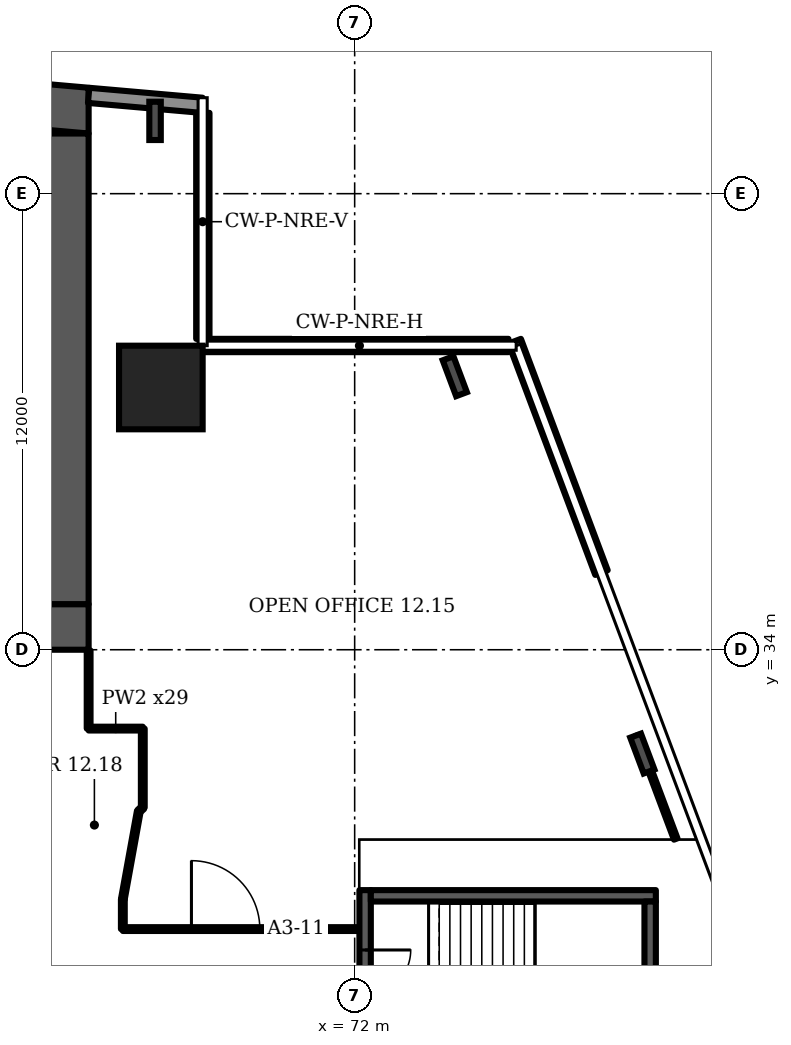
"""IFC4 building model, lengths in metres.
Left out: names, types, materials, properties, quantities, classifications, styles, units other than length and angle.
Written with IfcOpenShell. Run it as: python <this file> out.ifc"""

import sys

from ifc_helpers import new_model, si_unit, direction, frame, frame_2d, origin, origin_2d, place, context, subcontext, project, spatial, polyline, rectangle, i_section, outline, extrude, element, fill, save


model = new_model("IFC4")
c1 = context("Model", 3, precision=1e-05, world=origin(), true_north=direction((0.0, 1.0)))
c2 = subcontext(c1, "Body", "Model", "MODEL_VIEW")
j1 = project(units=[si_unit("LENGTHUNIT", "METRE"), si_unit("PLANEANGLEUNIT", "RADIAN")], contexts=[c1])
p1 = place(None, origin())
s1 = spatial("IfcSite", under=j1, at=p1, CompositionType="ELEMENT")
p2 = place(p1, origin())
s2 = spatial("IfcBuilding", under=s1, at=p2, CompositionType="ELEMENT")
p3 = place(p2, frame((0.0, 0.0, 63.1)))
s3 = spatial("IfcBuildingStorey", under=s2, at=p3, CompositionType="ELEMENT", Elevation=63.1)
p4 = place(p3, frame((0.0, 0.0, -0.0)))
e1 = element("IfcWall", 1, at=p4, inside=s3, PredefinedType="SHEAR", context=c2, shape_type="SweptSolid", body=[
    extrude(outline(polyline([(9.0, 47.583), (37.0, 50.032), (65.0, 47.583), (65.0, 48.787), (37.0, 51.237), (9.0, 48.787), (9.0, 47.583)])), origin(), (0.0, 0.0, 1.0), 3.6),
])
p5 = place(p3, frame((9.0, 34.6, 0.0), z_axis=(0.0, 0.0, 1.0), x_axis=(1.0, 0.0, 0.0)))
e2 = element("IfcWall", 2, at=p5, inside=s3, PredefinedType="SHEAR", context=c2, shape_type="SweptSolid", body=[
    extrude(rectangle(XDim=56.0, YDim=1.2, at=frame_2d((28.0, 0.0))), origin(), (0.0, 0.0, 1.0), 3.6),
])
p6 = place(p5, frame((3.3, 0.0, 0.0)))
e3 = element("IfcOpeningElement", 3, at=p6, cuts=e2, PredefinedType="OPENING", context=c2, shape_type="SweptSolid", body=[
    extrude(rectangle(XDim=1.0, YDim=2.1, at=frame_2d((0.5, 1.05))), frame((0.0, 0.61, 0.0), z_axis=(0.0, -1.0, 0.0), x_axis=(1.0, 0.0, 0.0)), (0.0, 0.0, 1.0), 1.22),
])
p7 = place(p5, frame((7.867, 0.0, 0.0)))
e4 = element("IfcOpeningElement", 4, at=p7, cuts=e2, PredefinedType="OPENING", context=c2, shape_type="SweptSolid", body=[
    extrude(rectangle(XDim=1.1, YDim=2.1, at=frame_2d((0.55, 1.05))), frame((0.0, 0.61, 0.0), z_axis=(0.0, -1.0, 0.0), x_axis=(1.0, 0.0, 0.0)), (0.0, 0.0, 1.0), 1.22),
])
p8 = place(p5, frame((12.033, 0.0, 0.0)))
e5 = element("IfcOpeningElement", 5, at=p8, cuts=e2, PredefinedType="OPENING", context=c2, shape_type="SweptSolid", body=[
    extrude(rectangle(XDim=1.1, YDim=2.1, at=frame_2d((0.55, 1.05))), frame((0.0, 0.61, 0.0), z_axis=(0.0, -1.0, 0.0), x_axis=(1.0, 0.0, 0.0)), (0.0, 0.0, 1.0), 1.22),
])
p9 = place(p5, frame((9.8, 0.0, 0.0)))
e6 = element("IfcOpeningElement", 6, at=p9, cuts=e2, PredefinedType="OPENING", context=c2, shape_type="SweptSolid", body=[
    extrude(rectangle(XDim=1.4, YDim=2.1, at=frame_2d((0.7, 1.05))), frame((0.0, 0.61, 0.0), z_axis=(0.0, -1.0, 0.0), x_axis=(1.0, 0.0, 0.0)), (0.0, 0.0, 1.0), 1.22),
])
p10 = place(p5, frame((14.65, 0.0, 0.0)))
e7 = element("IfcOpeningElement", 7, at=p10, cuts=e2, PredefinedType="OPENING", context=c2, shape_type="SweptSolid", body=[
    extrude(rectangle(XDim=1.2, YDim=2.1, at=frame_2d((0.6, 1.05))), frame((0.0, 0.61, 0.0), z_axis=(0.0, -1.0, 0.0), x_axis=(1.0, 0.0, 0.0)), (0.0, 0.0, 1.0), 1.22),
])
p11 = place(p5, frame((21.867, 0.0, 0.0)))
e8 = element("IfcOpeningElement", 8, at=p11, cuts=e2, PredefinedType="OPENING", context=c2, shape_type="SweptSolid", body=[
    extrude(rectangle(XDim=1.1, YDim=2.1, at=frame_2d((0.55, 1.05))), frame((0.0, 0.61, 0.0), z_axis=(0.0, -1.0, 0.0), x_axis=(1.0, 0.0, 0.0)), (0.0, 0.0, 1.0), 1.22),
])
p12 = place(p5, frame((26.033, 0.0, 0.0)))
e9 = element("IfcOpeningElement", 9, at=p12, cuts=e2, PredefinedType="OPENING", context=c2, shape_type="SweptSolid", body=[
    extrude(rectangle(XDim=1.1, YDim=2.1, at=frame_2d((0.55, 1.05))), frame((0.0, 0.61, 0.0), z_axis=(0.0, -1.0, 0.0), x_axis=(1.0, 0.0, 0.0)), (0.0, 0.0, 1.0), 1.22),
])
p13 = place(p5, frame((23.8, 0.0, 0.0)))
e10 = element("IfcOpeningElement", 10, at=p13, cuts=e2, PredefinedType="OPENING", context=c2, shape_type="SweptSolid", body=[
    extrude(rectangle(XDim=1.4, YDim=2.1, at=frame_2d((0.7, 1.05))), frame((0.0, 0.61, 0.0), z_axis=(0.0, -1.0, 0.0), x_axis=(1.0, 0.0, 0.0)), (0.0, 0.0, 1.0), 1.22),
])
p14 = place(p5, frame((28.867, 0.0, 0.0)))
e11 = element("IfcOpeningElement", 11, at=p14, cuts=e2, PredefinedType="OPENING", context=c2, shape_type="SweptSolid", body=[
    extrude(rectangle(XDim=1.1, YDim=2.1, at=frame_2d((0.55, 1.05))), frame((0.0, 0.61, 0.0), z_axis=(0.0, -1.0, 0.0), x_axis=(1.0, 0.0, 0.0)), (0.0, 0.0, 1.0), 1.22),
])
p15 = place(p5, frame((33.033, 0.0, 0.0)))
e12 = element("IfcOpeningElement", 12, at=p15, cuts=e2, PredefinedType="OPENING", context=c2, shape_type="SweptSolid", body=[
    extrude(rectangle(XDim=1.1, YDim=2.1, at=frame_2d((0.55, 1.05))), frame((0.0, 0.61, 0.0), z_axis=(0.0, -1.0, 0.0), x_axis=(1.0, 0.0, 0.0)), (0.0, 0.0, 1.0), 1.22),
])
p16 = place(p5, frame((40.15, 0.0, 0.0)))
e13 = element("IfcOpeningElement", 13, at=p16, cuts=e2, PredefinedType="OPENING", context=c2, shape_type="SweptSolid", body=[
    extrude(rectangle(XDim=1.2, YDim=2.1, at=frame_2d((0.6, 1.05))), frame((0.0, 0.61, 0.0), z_axis=(0.0, -1.0, 0.0), x_axis=(1.0, 0.0, 0.0)), (0.0, 0.0, 1.0), 1.22),
])
p17 = place(p5, frame((44.8, 0.0, 0.0)))
e14 = element("IfcOpeningElement", 14, at=p17, cuts=e2, PredefinedType="OPENING", context=c2, shape_type="SweptSolid", body=[
    extrude(rectangle(XDim=1.4, YDim=2.1, at=frame_2d((0.7, 1.05))), frame((0.0, 0.61, 0.0), z_axis=(0.0, -1.0, 0.0), x_axis=(1.0, 0.0, 0.0)), (0.0, 0.0, 1.0), 1.22),
])
p18 = place(p5, frame((49.867, 0.0, 0.0)))
e15 = element("IfcOpeningElement", 15, at=p18, cuts=e2, PredefinedType="OPENING", context=c2, shape_type="SweptSolid", body=[
    extrude(rectangle(XDim=1.1, YDim=2.1, at=frame_2d((0.55, 1.05))), frame((0.0, 0.61, 0.0), z_axis=(0.0, -1.0, 0.0), x_axis=(1.0, 0.0, 0.0)), (0.0, 0.0, 1.0), 1.22),
])
p19 = place(p5, frame((53.5, 0.0, 0.0)))
e16 = element("IfcOpeningElement", 16, at=p19, cuts=e2, PredefinedType="OPENING", context=c2, shape_type="SweptSolid", body=[
    extrude(rectangle(XDim=1.1, YDim=2.1, at=frame_2d((0.55, 1.05))), frame((0.0, 0.61, 0.0), z_axis=(0.0, -1.0, 0.0), x_axis=(1.0, 0.0, 0.0)), (0.0, 0.0, 1.0), 1.22),
])
p20 = place(p5, frame((51.567, 0.0, 0.0)))
e17 = element("IfcOpeningElement", 17, at=p20, cuts=e2, PredefinedType="OPENING", context=c2, shape_type="SweptSolid", body=[
    extrude(rectangle(XDim=1.4, YDim=2.1, at=frame_2d((0.7, 1.05))), frame((0.0, 0.61, 0.0), z_axis=(0.0, -1.0, 0.0), x_axis=(1.0, 0.0, 0.0)), (0.0, 0.0, 1.0), 1.22),
])
p21 = place(p3, frame((64.4, 35.2, 0.0), z_axis=(0.0, 0.0, 1.0), x_axis=(0.0, 1.0, 0.0)))
e18 = element("IfcWall", 18, at=p21, inside=s3, PredefinedType="SHEAR", context=c2, shape_type="SweptSolid", body=[
    extrude(rectangle(XDim=12.383, YDim=1.2, at=frame_2d((6.191, 0.0))), origin(), (0.0, 0.0, 1.0), 3.6),
])
p22 = place(p3, frame((66.9, 40.9, 0.0), z_axis=(0.0, 0.0, 1.0), x_axis=(1.0, 0.0, 0.0)))
e19 = element("IfcColumn", 19, at=p22, inside=s3, PredefinedType="COLUMN", context=c2, shape_type="SweptSolid", body=[
    extrude(rectangle(XDim=2.2, YDim=2.2, at=origin_2d()), origin(), (0.0, 0.0, 1.0), 3.6),
])
for number, where, z_axis, x_axis in (
    (20, (79.57, 31.268, 0.0), (0.0, 0.0, 1.0), (0.936, 0.351, 0.0)),
    (21, (74.634, 41.196, 0.0), (0.0, 0.0, 1.0), (0.936, 0.351, 0.0)),
    (22, (66.748, 47.915, 0.0), (0.0, 0.0, 1.0), (1.0, 0.0, 0.0)),
):
    element("IfcColumn", number, at=place(p3, frame(where, z_axis=z_axis, x_axis=x_axis)), inside=s3, PredefinedType="COLUMN", context=c2, shape_type="SweptSolid", body=[
        extrude(i_section(OverallWidth=0.302, OverallDepth=1.008, WebThickness=0.021, FlangeThickness=0.04, FilletRadius=0.03, at=origin_2d()), origin(), (0.0, 0.0, 1.0), 3.6),
    ])
p23 = place(p3, frame((67.983, 48.326, 0.0), z_axis=(0.0, 0.0, 1.0), x_axis=(-0.996194, 0.087168, 0.0)))
e23 = element("IfcWall", 23, at=p23, inside=s3, PredefinedType="SOLIDWALL", context=c2, shape_type="SweptSolid", body=[
    extrude(rectangle(XDim=2.994, YDim=0.4, at=frame_2d((1.497, 0.0))), origin(), (0.0, 0.0, 1.0), 3.2),
])
p24 = place(p3, frame((78.494, 36.03, 0.0), z_axis=(0.0, 0.0, 1.0), x_axis=(-0.351108, 0.936338, 0.0)))
e24 = element("IfcWall", 24, at=p24, inside=s3, PredefinedType="SOLIDWALL", context=c2, shape_type="SweptSolid", body=[
    extrude(rectangle(XDim=6.503, YDim=0.35, at=frame_2d((3.251, 0.0))), origin(), (0.0, 0.0, 1.0), 1.0),
])
p25 = place(p3, frame((76.047, 42.005, 0.0), z_axis=(0.0, 0.0, 1.0), x_axis=(-1.0, 0.0, 0.0)))
e25 = element("IfcWall", 25, at=p25, inside=s3, PredefinedType="SOLIDWALL", context=c2, shape_type="SweptSolid", body=[
    extrude(rectangle(XDim=8.047, YDim=0.35, at=frame_2d((4.023, 0.0))), origin(), (0.0, 0.0, 1.0), 1.0),
])
p26 = place(p3, frame((68.005, 42.18, 0.0), z_axis=(0.0, 0.0, 1.0), x_axis=(0.0, 1.0, 0.0)))
e26 = element("IfcWall", 26, at=p26, inside=s3, PredefinedType="SOLIDWALL", context=c2, shape_type="SweptSolid", body=[
    extrude(rectangle(XDim=5.947, YDim=0.35, at=frame_2d((2.973, 0.0))), origin(), (0.0, 0.0, 1.0), 1.0),
])
p27 = place(p3, frame((72.275, 23.325, 0.0), z_axis=(0.0, 0.0, 1.0), x_axis=(0.0, 1.0, 0.0)))
e27 = element("IfcWall", 27, at=p27, inside=s3, PredefinedType="SHEAR", context=c2, shape_type="SweptSolid", body=[
    extrude(rectangle(XDim=4.35, YDim=0.3, at=frame_2d((2.175, 0.0))), origin(), (0.0, 0.0, 1.0), 3.2),
])
p28 = place(p27, frame((1.575, 0.0, 0.0)))
e28 = element("IfcOpeningElement", 28, at=p28, cuts=e27, PredefinedType="OPENING", context=c2, shape_type="SweptSolid", body=[
    extrude(rectangle(XDim=1.2, YDim=2.1, at=frame_2d((0.6, 1.05))), frame((0.0, 0.16, 0.0), z_axis=(0.0, -1.0, 0.0), x_axis=(1.0, 0.0, 0.0)), (0.0, 0.0, 1.0), 0.32),
])
p29 = place(p3, frame((65.0, 31.925, 0.0), z_axis=(0.0, 0.0, 1.0), x_axis=(0.0, 1.0, 0.0)))
e29 = element("IfcWall", 29, at=p29, inside=s3, PredefinedType="PARTITIONING", context=c2, shape_type="SweptSolid", body=[
    extrude(rectangle(XDim=2.055, YDim=0.1, at=frame_2d((1.027, 0.0))), origin(), (0.0, 0.0, 1.0), 3.2),
])
p30 = place(p3, frame((65.0, 31.925, 0.0), z_axis=(0.0, 0.0, 1.0), x_axis=(1.0, 0.0, 0.0)))
e30 = element("IfcWall", 30, at=p30, inside=s3, PredefinedType="PARTITIONING", context=c2, shape_type="SweptSolid", body=[
    extrude(rectangle(XDim=1.425, YDim=0.1, at=frame_2d((0.712, 0.0))), origin(), (0.0, 0.0, 1.0), 3.2),
])
p31 = place(p3, frame((65.9, 26.65, 0.0), z_axis=(0.0, 0.0, 1.0), x_axis=(0.0, 1.0, 0.0)))
e31 = element("IfcWall", 31, at=p31, inside=s3, PredefinedType="PARTITIONING", context=c2, shape_type="SweptSolid", body=[
    extrude(rectangle(XDim=0.785, YDim=0.1, at=frame_2d((0.393, 0.0))), origin(), (0.0, 0.0, 1.0), 3.2),
])
p32 = place(p3, frame((65.9, 26.65, 0.0), z_axis=(0.0, 0.0, 1.0), x_axis=(1.0, 0.0, 0.0)))
e32 = element("IfcWall", 32, at=p32, inside=s3, PredefinedType="PARTITIONING", context=c2, shape_type="SweptSolid", body=[
    extrude(rectangle(XDim=6.205, YDim=0.1, at=frame_2d((3.103, 0.0))), origin(), (0.0, 0.0, 1.0), 3.2),
])
p33 = place(p32, frame((1.805, 0.0, 0.0)))
e33 = element("IfcOpeningElement", 33, at=p33, cuts=e32, PredefinedType="OPENING", context=c2, shape_type="SweptSolid", body=[
    extrude(rectangle(XDim=1.8, YDim=2.1, at=frame_2d((0.9, 1.05))), frame((0.0, 0.06, 0.0), z_axis=(0.0, -1.0, 0.0), x_axis=(1.0, 0.0, 0.0)), (0.0, 0.0, 1.0), 0.12),
])
p34 = place(p3, frame((65.9, 27.435, 0.0), z_axis=(0.0, 0.0, 1.0), x_axis=(0.178584, 0.983924, 0.0)))
e34 = element("IfcWall", 34, at=p34, inside=s3, PredefinedType="PARTITIONING", context=c2, shape_type="SweptSolid", body=[
    extrude(rectangle(XDim=2.353, YDim=0.1, at=frame_2d((1.176, 0.0))), origin(), (0.0, 0.0, 1.0), 3.2),
])
p35 = place(p3, frame((66.32, 29.75, 0.0), z_axis=(0.0, 0.0, 1.0), x_axis=(0.741581, 0.670872, 0.0)))
e35 = element("IfcWall", 35, at=p35, inside=s3, PredefinedType="PARTITIONING", context=c2, shape_type="SweptSolid", body=[
    extrude(rectangle(XDim=0.142, YDim=0.1, at=frame_2d((0.071, 0.0))), origin(), (0.0, 0.0, 1.0), 3.2),
])
p36 = place(p3, frame((66.425, 29.845, 0.0), z_axis=(0.0, 0.0, 1.0), x_axis=(0.0, 1.0, 0.0)))
e36 = element("IfcWall", 36, at=p36, inside=s3, PredefinedType="PARTITIONING", context=c2, shape_type="SweptSolid", body=[
    extrude(rectangle(XDim=2.08, YDim=0.1, at=frame_2d((1.04, 0.0))), origin(), (0.0, 0.0, 1.0), 3.2),
])
p37 = place(p3, frame((80.448, 29.02, 0.0), z_axis=(0.0, 0.0, 1.0), x_axis=(-0.35129, 0.93627, 0.0)))
e37 = element("IfcWall", 37, at=p37, inside=s3, PredefinedType="PARTITIONING", context=c2, shape_type="SweptSolid", body=[
    extrude(rectangle(XDim=2.911, YDim=0.1, at=frame_2d((1.455, 0.0))), origin(), (0.0, 0.0, 1.0), 2.58),
])
p38 = place(p3, frame((72.425, 27.525, 0.0), z_axis=(0.0, 0.0, 1.0), x_axis=(1.0, 0.0, 0.0)))
e38 = element("IfcWall", 38, at=p38, inside=s3, PredefinedType="SHEAR", context=c2, shape_type="SweptSolid", body=[
    extrude(rectangle(XDim=7.5, YDim=0.3, at=frame_2d((3.75, 0.0))), origin(), (0.0, 0.0, 1.0), 3.2),
])
p39 = place(p3, frame((79.775, 23.625, 0.0), z_axis=(0.0, 0.0, 1.0), x_axis=(0.0, 1.0, 0.0)))
e39 = element("IfcWall", 39, at=p39, inside=s3, PredefinedType="SHEAR", context=c2, shape_type="SweptSolid", body=[
    extrude(rectangle(XDim=3.75, YDim=0.3, at=frame_2d((1.875, 0.0))), origin(), (0.0, 0.0, 1.0), 3.2),
])
p40 = place(p28, origin())
e40 = element("IfcDoor", 40, at=p40, inside=s3, OperationType="SINGLE_SWING_RIGHT", PredefinedType="DOOR", context=c2, shape_type="SweptSolid", body=[
    extrude(rectangle(XDim=1.2, YDim=2.1, at=frame_2d((0.6, 1.05))), frame((0.0, 0.025, 0.0), z_axis=(0.0, -1.0, 0.0), x_axis=(1.0, 0.0, 0.0)), (0.0, 0.0, 1.0), 0.05),
])
fill(e28, e40)
p41 = place(p33, origin())
e41 = element("IfcDoor", 41, at=p41, inside=s3, OperationType="DOUBLE_DOOR_SINGLE_SWING", PredefinedType="DOOR", context=c2, shape_type="SweptSolid", body=[
    extrude(rectangle(XDim=1.8, YDim=2.1, at=frame_2d((0.9, 1.05))), frame((0.0, 0.025, 0.0), z_axis=(0.0, -1.0, 0.0), x_axis=(1.0, 0.0, 0.0)), (0.0, 0.0, 1.0), 0.05),
])
fill(e33, e41)
save(model, sys.argv[1])
